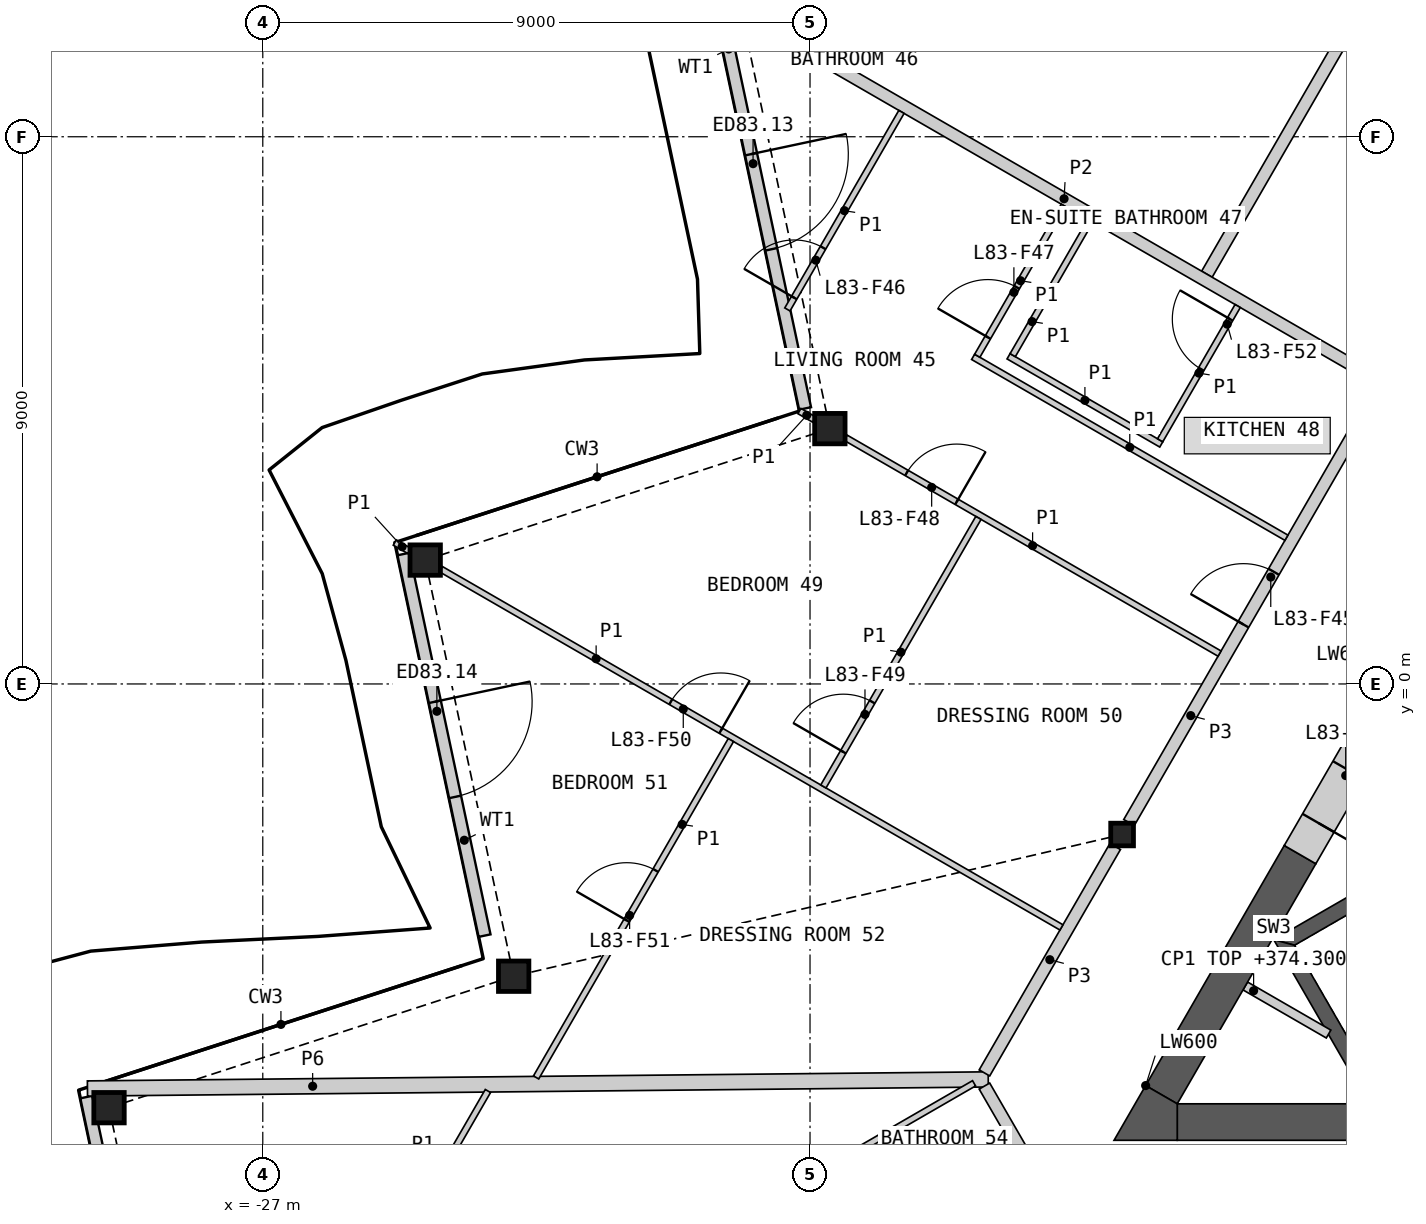
"""IFC4 building model, lengths in metres.
Left out: names, types, materials, properties, quantities, classifications, styles, units other than length and angle.
Written with IfcOpenShell. Run it as: python <this file> out.ifc"""

import sys

from ifc_helpers import new_model, si_unit, direction, frame, frame_2d, origin, origin_2d, place, context, subcontext, project, spatial, polyline, rectangle, hollow_rectangle, i_section, outline, extrude, element, fill, save


model = new_model("IFC4")
c1 = context("Model", 3, precision=1e-05, world=origin(), true_north=direction((0.0, 1.0)))
c2 = subcontext(c1, "Body", "Model", "MODEL_VIEW")
j1 = project(units=[si_unit("LENGTHUNIT", "METRE"), si_unit("PLANEANGLEUNIT", "RADIAN")], contexts=[c1])
p1 = place(None, origin())
s1 = spatial("IfcSite", under=j1, at=p1, CompositionType="ELEMENT")
p2 = place(p1, origin())
s2 = spatial("IfcBuilding", under=s1, at=p2, CompositionType="ELEMENT")
p3 = place(p2, frame((0.0, 0.0, 371.2)))
s3 = spatial("IfcBuildingStorey", under=s2, at=p3, CompositionType="ELEMENT", Elevation=371.2)
for number, where, z_axis, x_axis in (
    (1, (-17.674, 4.199, 0.0), (0.0, 0.0, 1.0), (1.0, 0.0, 0.0)),
    (2, (-24.329, 2.037, 0.0), (0.0, 0.0, 1.0), (1.0, 0.0, 0.0)),
    (3, (-22.874, -4.807, 0.0), (0.0, 0.0, 1.0), (1.0, 0.0, 0.0)),
    (4, (-29.529, -6.969, 0.0), (0.0, 0.0, 1.0), (1.0, 0.0, 0.0)),
):
    element("IfcColumn", number, at=place(p3, frame(where, z_axis=z_axis, x_axis=x_axis)), inside=s3, PredefinedType="COLUMN", context=c2, shape_type="SweptSolid", body=[
        extrude(hollow_rectangle(XDim=0.5, YDim=0.5, WallThickness=0.03, at=origin_2d()), origin(), (0.0, 0.0, 1.0), 3.4),
    ])
p4 = place(p3, frame((-12.868, -2.476, 0.0), z_axis=(0.0, 0.0, 1.0), x_axis=(1.0, 0.0, 0.0)))
e5 = element("IfcColumn", 5, at=p4, inside=s3, PredefinedType="COLUMN", context=c2, shape_type="SweptSolid", body=[
    extrude(i_section(OverallWidth=0.374, OverallDepth=0.372, WebThickness=0.016, FlangeThickness=0.026, at=origin_2d()), origin(), (0.0, 0.0, 1.0), 3.4),
])
p5 = place(p3, frame((-19.477, 11.1, 0.0), z_axis=(0.0, 0.0, 1.0), x_axis=(0.207910061304, -0.978147947096, 0.0)))
e6 = element("IfcWall", 6, at=p5, inside=s3, PredefinedType="SOLIDWALL", context=c2, shape_type="SweptSolid", body=[
    extrude(rectangle(XDim=6.716, YDim=0.2, at=frame_2d((3.358, 0.0))), origin(), (0.0, 0.0, 1.0), 2.634),
])
p6 = place(p5, frame((2.439, 0.0, 0.0)))
e7 = element("IfcOpeningElement", 7, at=p6, cuts=e6, PredefinedType="OPENING", context=c2, shape_type="SweptSolid", body=[
    extrude(rectangle(XDim=1.6, YDim=2.25, at=frame_2d((0.8, 1.125))), frame((0.0, 0.11, 0.0), z_axis=(0.0, -1.0, 0.0), x_axis=(1.0, 0.0, 0.0)), (0.0, 0.0, 1.0), 0.22),
])
p7 = place(p3, frame((-24.687, 2.137, 0.0), z_axis=(0.0, 0.0, 1.0), x_axis=(0.207904718109, -0.978149082803, 0.0)))
e8 = element("IfcWall", 8, at=p7, inside=s3, PredefinedType="SOLIDWALL", context=c2, shape_type="SweptSolid", body=[
    extrude(rectangle(XDim=6.416, YDim=0.2, at=frame_2d((3.208, 0.0))), origin(), (0.0, 0.0, 1.0), 2.634),
])
p8 = place(p7, frame((2.484, 0.0, 0.0)))
e9 = element("IfcOpeningElement", 9, at=p8, cuts=e8, PredefinedType="OPENING", context=c2, shape_type="SweptSolid", body=[
    extrude(rectangle(XDim=1.6, YDim=2.25, at=frame_2d((0.8, 1.125))), frame((0.0, 0.11, 0.0), z_axis=(0.0, -1.0, 0.0), x_axis=(1.0, 0.0, 0.0)), (0.0, 0.0, 1.0), 0.22),
])
p9 = place(p3, frame((-29.903, -6.795, 0.0), z_axis=(0.0, 0.0, 1.0), x_axis=(0.207923959653, -0.978144992832, 0.0)))
e10 = element("IfcWall", 10, at=p9, inside=s3, PredefinedType="SOLIDWALL", context=c2, shape_type="SweptSolid", body=[
    extrude(rectangle(XDim=6.493, YDim=0.2, at=frame_2d((3.247, 0.0))), origin(), (0.0, 0.0, 1.0), 2.634),
])
p10 = place(p9, frame((2.561, 0.0, 0.0)))
e11 = element("IfcOpeningElement", 11, at=p10, cuts=e10, PredefinedType="OPENING", context=c2, shape_type="SweptSolid", body=[
    extrude(rectangle(XDim=1.6, YDim=2.25, at=frame_2d((0.8, 1.125))), frame((0.0, 0.11, 0.0), z_axis=(0.0, -1.0, 0.0), x_axis=(1.0, 0.0, 0.0)), (0.0, 0.0, 1.0), 0.22),
])
p11 = place(p3, origin())
e12 = element("IfcWall", 12, at=p11, inside=s3, PredefinedType="SHEAR", context=c2, shape_type="SweptSolid", body=[
    extrude(outline(polyline([(-5.307, -1.281), (-10.374, -4.206), (-10.032, -4.298), (-5.182, -1.498), (-5.307, -1.281)])), origin(), (0.0, 0.0, 1.0), 3.1),
])
p12 = place(p3, origin())
e13 = element("IfcWall", 13, at=p12, inside=s3, PredefinedType="SHEAR", context=c2, shape_type="SweptSolid", body=[
    extrude(outline(polyline([(-10.374, -4.206), (-8.83, -6.881), (-8.738, -6.539), (-10.032, -4.298), (-10.374, -4.206)])), origin(), (0.0, 0.0, 1.0), 3.1),
])
p13 = place(p3, frame((-10.842, -4.967, 0.0), z_axis=(0.0, 0.0, 1.0), x_axis=(0.866098216386, -0.499873863663, 0.0)))
e14 = element("IfcWall", 14, at=p13, inside=s3, PredefinedType="PARTITIONING", context=c2, shape_type="SweptSolid", body=[
    extrude(rectangle(XDim=1.582, YDim=0.15, at=frame_2d((0.791, 0.0))), origin(), (0.0, 0.0, 1.0), 3.1),
])
p14 = place(p3, frame((-11.961, -7.206, 0.0), z_axis=(0.0, 0.0, 1.0), x_axis=(1.0, 0.0, 0.0)))
e15 = element("IfcWall", 15, at=p14, inside=s3, PredefinedType="SHEAR", context=c2, shape_type="SweptSolid", body=[
    extrude(rectangle(XDim=4.868, YDim=0.6, at=frame_2d((2.434, 0.0))), origin(), (0.0, 0.0, 1.0), 3.1),
])
p15 = place(p3, frame((-9.941, -2.807, 0.0), z_axis=(0.0, 0.0, 1.0), x_axis=(-0.500020646047, -0.866013483456, 0.0)))
e16 = element("IfcWall", 16, at=p15, inside=s3, PredefinedType="SHEAR", context=c2, shape_type="SweptSolid", body=[
    extrude(rectangle(XDim=4.559, YDim=0.6, at=frame_2d((2.28, 0.0))), origin(), (0.0, 0.0, 1.0), 3.1),
])
p16 = place(p3, origin())
e17 = element("IfcWall", 17, at=p16, inside=s3, PredefinedType="SHEAR", context=c2, shape_type="SweptSolid", body=[
    extrude(outline(polyline([(-12.48, -6.606), (-11.961, -6.906), (-11.961, -7.506), (-13.0, -7.506), (-12.48, -6.606)])), origin(), (0.0, 0.0, 1.0), 3.1),
])
p17 = place(p3, frame((-8.44, -0.208, 0.0), z_axis=(0.0, 0.0, 1.0), x_axis=(-0.499997052475, -0.866027105532, 0.0)))
e18 = element("IfcWall", 18, at=p17, inside=s3, PredefinedType="SHEAR", context=c2, shape_type="SweptSolid", body=[
    extrude(rectangle(XDim=3.001, YDim=0.6, at=frame_2d((1.501, 0.0))), origin(), (0.0, 0.0, 1.0), 3.1),
])
p18 = place(p17, frame((1.4, 0.0, 0.0)))
e19 = element("IfcOpeningElement", 19, at=p18, cuts=e18, PredefinedType="OPENING", context=c2, shape_type="SweptSolid", body=[
    extrude(rectangle(XDim=1.0, YDim=2.1, at=frame_2d((0.5, 1.05))), frame((0.0, 0.31, 0.0), z_axis=(0.0, -1.0, 0.0), x_axis=(1.0, 0.0, 0.0)), (0.0, 0.0, 1.0), 0.62),
])
p19 = place(p3, frame((-29.883, -6.654, 0.0), z_axis=(0.0, 0.0, 1.0), x_axis=(0.999949143254, 0.010085182526, 0.0)))
e20 = element("IfcWall", 20, at=p19, inside=s3, PredefinedType="PARTITIONING", context=c2, shape_type="SweptSolid", body=[
    extrude(rectangle(XDim=14.815, YDim=0.25, at=frame_2d((7.408, 0.0))), origin(), (0.0, 0.0, 1.0), 2.33),
])
p20 = place(p3, frame((-12.754, -2.279, 0.0), z_axis=(0.0, 0.0, 1.0), x_axis=(0.500001682468, 0.866024432409, 0.0)))
e21 = element("IfcWall", 21, at=p20, inside=s3, PredefinedType="PARTITIONING", context=c2, shape_type="SweptSolid", body=[
    extrude(rectangle(XDim=8.124, YDim=0.2, at=frame_2d((4.062, 0.0))), origin(), (0.0, 0.0, 1.0), 3.1),
])
p21 = place(p20, frame((3.762, 0.0, 0.0)))
e22 = element("IfcOpeningElement", 22, at=p21, cuts=e21, PredefinedType="OPENING", context=c2, shape_type="SweptSolid", body=[
    extrude(rectangle(XDim=1.0, YDim=2.1, at=frame_2d((0.5, 1.05))), frame((0.0, 0.11, 0.0), z_axis=(0.0, -1.0, 0.0), x_axis=(1.0, 0.0, 0.0)), (0.0, 0.0, 1.0), 0.22),
])
p22 = place(p3, frame((-15.131, -6.397, 0.0), z_axis=(0.0, 0.0, 1.0), x_axis=(0.499986217557, 0.866033360935, 0.0)))
e23 = element("IfcWall", 23, at=p22, inside=s3, PredefinedType="PARTITIONING", context=c2, shape_type="SweptSolid", body=[
    extrude(rectangle(XDim=4.3, YDim=0.2, at=frame_2d((2.15, 0.0))), origin(), (0.0, 0.0, 1.0), 3.1),
])
p23 = place(p3, frame((-15.131, -6.614, 0.0), z_axis=(0.0, 0.0, 1.0), x_axis=(0.499967746641, -0.866044024469, 0.0)))
e24 = element("IfcWall", 24, at=p23, inside=s3, PredefinedType="PARTITIONING", context=c2, shape_type="SweptSolid", body=[
    extrude(rectangle(XDim=3.676, YDim=0.2, at=frame_2d((1.838, 0.0))), origin(), (0.0, 0.0, 1.0), 3.1),
])
p24 = place(p23, frame((2.426, 0.0, 0.0)))
e25 = element("IfcOpeningElement", 25, at=p24, cuts=e24, PredefinedType="OPENING", context=c2, shape_type="SweptSolid", body=[
    extrude(rectangle(XDim=1.0, YDim=2.1, at=frame_2d((0.5, 1.05))), frame((0.0, 0.11, 0.0), z_axis=(0.0, -1.0, 0.0), x_axis=(1.0, 0.0, 0.0)), (0.0, 0.0, 1.0), 0.22),
])
p25 = place(p3, frame((-11.473, 6.74, 0.0), z_axis=(0.0, 0.0, 1.0), x_axis=(0.500001082559, 0.866024778768, 0.0)))
e26 = element("IfcWall", 26, at=p25, inside=s3, PredefinedType="PARTITIONING", context=c2, shape_type="SweptSolid", body=[
    extrude(rectangle(XDim=15.094, YDim=0.2, at=frame_2d((7.547, 0.0))), origin(), (0.0, 0.0, 1.0), 2.33),
])
p26 = place(p25, frame((10.383, 0.0, 0.0)))
e27 = element("IfcOpeningElement", 27, at=p26, cuts=e26, PredefinedType="OPENING", context=c2, shape_type="SweptSolid", body=[
    extrude(rectangle(XDim=0.95, YDim=2.1, at=frame_2d((0.475, 1.05))), frame((0.0, 0.11, 0.0), z_axis=(0.0, -1.0, 0.0), x_axis=(1.0, 0.0, 0.0)), (0.0, 0.0, 1.0), 0.22),
])
p27 = place(p3, frame((-18.869, 10.894, 0.0), z_axis=(0.0, 0.0, 1.0), x_axis=(0.866023724155, -0.500002909193, 0.0)))
e28 = element("IfcWall", 28, at=p27, inside=s3, PredefinedType="PARTITIONING", context=c2, shape_type="SweptSolid", body=[
    extrude(rectangle(XDim=11.655, YDim=0.2, at=frame_2d((5.827, 0.0))), origin(), (0.0, 0.0, 1.0), 2.33),
])
p28 = place(p3, frame((-24.069, 1.887, 0.0), z_axis=(0.0, 0.0, 1.0), x_axis=(0.866023404247, -0.500003463284, 0.0)))
e29 = element("IfcWall", 29, at=p28, inside=s3, PredefinedType="PARTITIONING", context=c2, shape_type="SweptSolid", body=[
    extrude(rectangle(XDim=11.782, YDim=0.1, at=frame_2d((5.891, 0.0))), origin(), (0.0, 0.0, 1.0), 2.33),
])
p29 = place(p28, frame((4.363, 0.0, 0.0)))
e30 = element("IfcOpeningElement", 30, at=p29, cuts=e29, PredefinedType="OPENING", context=c2, shape_type="SweptSolid", body=[
    extrude(rectangle(XDim=0.95, YDim=2.1, at=frame_2d((0.475, 1.05))), frame((0.0, 0.06, 0.0), z_axis=(0.0, -1.0, 0.0), x_axis=(1.0, 0.0, 0.0)), (0.0, 0.0, 1.0), 0.12),
])
p30 = place(p3, frame((-17.414, 4.049, 0.0), z_axis=(0.0, 0.0, 1.0), x_axis=(0.866033839264, -0.499985389037, 0.0)))
e31 = element("IfcWall", 31, at=p30, inside=s3, PredefinedType="PARTITIONING", context=c2, shape_type="SweptSolid", body=[
    extrude(rectangle(XDim=7.1, YDim=0.1, at=frame_2d((3.55, 0.0))), origin(), (0.0, 0.0, 1.0), 2.33),
])
p31 = place(p30, frame((1.158, 0.0, 0.0)))
e32 = element("IfcOpeningElement", 32, at=p31, cuts=e31, PredefinedType="OPENING", context=c2, shape_type="SweptSolid", body=[
    extrude(rectangle(XDim=0.95, YDim=2.1, at=frame_2d((0.475, 1.05))), frame((0.0, 0.06, 0.0), z_axis=(0.0, -1.0, 0.0), x_axis=(1.0, 0.0, 0.0)), (0.0, 0.0, 1.0), 0.12),
])
p32 = place(p3, frame((-22.505, -6.472, 0.0), z_axis=(0.0, 0.0, 1.0), x_axis=(0.499999516514, 0.866025682925, 0.0)))
e33 = element("IfcWall", 33, at=p32, inside=s3, PredefinedType="PARTITIONING", context=c2, shape_type="SweptSolid", body=[
    extrude(rectangle(XDim=6.407, YDim=0.1, at=frame_2d((3.204, 0.0))), origin(), (0.0, 0.0, 1.0), 2.33),
])
p33 = place(p32, frame((2.981, 0.0, 0.0)))
e34 = element("IfcOpeningElement", 34, at=p33, cuts=e33, PredefinedType="OPENING", context=c2, shape_type="SweptSolid", body=[
    extrude(rectangle(XDim=0.95, YDim=2.1, at=frame_2d((0.475, 1.05))), frame((0.0, 0.06, 0.0), z_axis=(0.0, -1.0, 0.0), x_axis=(1.0, 0.0, 0.0)), (0.0, 0.0, 1.0), 0.12),
])
p34 = place(p3, frame((-15.318, 5.38, 0.0), z_axis=(0.0, 0.0, 1.0), x_axis=(0.866035260786, -0.499982926783, 0.0)))
e35 = element("IfcWall", 35, at=p34, inside=s3, PredefinedType="PARTITIONING", context=c2, shape_type="SweptSolid", body=[
    extrude(rectangle(XDim=5.95, YDim=0.1, at=frame_2d((2.975, 0.0))), origin(), (0.0, 0.0, 1.0), 2.33),
])
p35 = place(p3, frame((-17.78, -1.686, 0.0), z_axis=(0.0, 0.0, 1.0), x_axis=(0.500005610874, 0.86602216432, 0.0)))
e36 = element("IfcWall", 36, at=p35, inside=s3, PredefinedType="PARTITIONING", context=c2, shape_type="SweptSolid", body=[
    extrude(rectangle(XDim=5.1, YDim=0.1, at=frame_2d((2.55, 0.0))), origin(), (0.0, 0.0, 1.0), 2.33),
])
p36 = place(p35, frame((0.656, 0.0, 0.0)))
e37 = element("IfcOpeningElement", 37, at=p36, cuts=e36, PredefinedType="OPENING", context=c2, shape_type="SweptSolid", body=[
    extrude(rectangle(XDim=0.95, YDim=2.1, at=frame_2d((0.475, 1.05))), frame((0.0, 0.06, 0.0), z_axis=(0.0, -1.0, 0.0), x_axis=(1.0, 0.0, 0.0)), (0.0, 0.0, 1.0), 0.12),
])
p37 = place(p3, frame((-18.372, 6.16, 0.0), z_axis=(0.0, 0.0, 1.0), x_axis=(0.499981580887, 0.866036037803, 0.0)))
e38 = element("IfcWall", 38, at=p37, inside=s3, PredefinedType="PARTITIONING", context=c2, shape_type="SweptSolid", body=[
    extrude(rectangle(XDim=3.752, YDim=0.1, at=frame_2d((1.876, 0.0))), origin(), (0.0, 0.0, 1.0), 2.33),
])
p38 = place(p37, frame((0.222, 0.0, 0.0)))
e39 = element("IfcOpeningElement", 39, at=p38, cuts=e38, PredefinedType="OPENING", context=c2, shape_type="SweptSolid", body=[
    extrude(rectangle(XDim=0.95, YDim=2.1, at=frame_2d((0.475, 1.05))), frame((0.0, 0.06, 0.0), z_axis=(0.0, -1.0, 0.0), x_axis=(1.0, 0.0, 0.0)), (0.0, 0.0, 1.0), 0.12),
])
p39 = place(p3, frame((-24.726, -9.169, 0.0), z_axis=(0.0, 0.0, 1.0), x_axis=(0.499971481985, 0.866041868042, 0.0)))
e40 = element("IfcWall", 40, at=p39, inside=s3, PredefinedType="PARTITIONING", context=c2, shape_type="SweptSolid", body=[
    extrude(rectangle(XDim=2.857, YDim=0.1, at=frame_2d((1.429, 0.0))), origin(), (0.0, 0.0, 1.0), 2.33),
])
p40 = place(p3, frame((-15.25, 5.398, 0.0), z_axis=(0.0, 0.0, 1.0), x_axis=(0.499935029643, 0.866062911188, 0.0)))
e41 = element("IfcWall", 41, at=p40, inside=s3, PredefinedType="PARTITIONING", context=c2, shape_type="SweptSolid", body=[
    extrude(rectangle(XDim=2.85, YDim=0.1, at=frame_2d((1.425, 0.0))), origin(), (0.0, 0.0, 1.0), 2.33),
])
p41 = place(p40, frame((0.35, 0.0, 0.0)))
e42 = element("IfcOpeningElement", 42, at=p41, cuts=e41, PredefinedType="OPENING", context=c2, shape_type="SweptSolid", body=[
    extrude(rectangle(XDim=0.95, YDim=2.1, at=frame_2d((0.475, 1.05))), frame((0.0, 0.06, 0.0), z_axis=(0.0, -1.0, 0.0), x_axis=(1.0, 0.0, 0.0)), (0.0, 0.0, 1.0), 0.12),
])
p42 = place(p3, frame((-14.735, 5.389, 0.0), z_axis=(0.0, 0.0, 1.0), x_axis=(0.866032775405, -0.499987231761, 0.0)))
e43 = element("IfcWall", 43, at=p42, inside=s3, PredefinedType="PARTITIONING", context=c2, shape_type="SweptSolid", body=[
    extrude(rectangle(XDim=2.9, YDim=0.1, at=frame_2d((1.45, 0.0))), origin(), (0.0, 0.0, 1.0), 2.33),
])
p43 = place(p3, frame((-17.575, -7.881, 0.0), z_axis=(0.0, 0.0, 1.0), x_axis=(0.866036909293, 0.499980071345, 0.0)))
e44 = element("IfcWall", 44, at=p43, inside=s3, PredefinedType="PARTITIONING", context=c2, shape_type="SweptSolid", body=[
    extrude(rectangle(XDim=2.625, YDim=0.1, at=frame_2d((1.312, 0.0))), origin(), (0.0, 0.0, 1.0), 2.33),
])
p44 = place(p3, frame((-12.242, 4.008, 0.0), z_axis=(0.0, 0.0, 1.0), x_axis=(0.499948979701, 0.866054858364, 0.0)))
e45 = element("IfcWall", 45, at=p44, inside=s3, PredefinedType="PARTITIONING", context=c2, shape_type="SweptSolid", body=[
    extrude(rectangle(XDim=2.55, YDim=0.1, at=frame_2d((1.275, 0.0))), origin(), (0.0, 0.0, 1.0), 2.33),
])
p45 = place(p44, frame((1.35, 0.0, 0.0)))
e46 = element("IfcOpeningElement", 46, at=p45, cuts=e45, PredefinedType="OPENING", context=c2, shape_type="SweptSolid", body=[
    extrude(rectangle(XDim=0.95, YDim=2.1, at=frame_2d((0.475, 1.05))), frame((0.0, 0.06, 0.0), z_axis=(0.0, -1.0, 0.0), x_axis=(1.0, 0.0, 0.0)), (0.0, 0.0, 1.0), 0.12),
])
p46 = place(p3, frame((-14.667, 5.408, 0.0), z_axis=(0.0, 0.0, 1.0), x_axis=(0.499948979701, 0.866054858364, 0.0)))
e47 = element("IfcWall", 47, at=p46, inside=s3, PredefinedType="PARTITIONING", context=c2, shape_type="SweptSolid", body=[
    extrude(rectangle(XDim=2.55, YDim=0.1, at=frame_2d((1.275, 0.0))), origin(), (0.0, 0.0, 1.0), 2.33),
])
for number, where, z_axis, x_axis in (
    (48, (-18.174, 4.488, 0.0), (0.0, 0.0, 1.0), (0.866, -0.5, 0.0)),
    (49, (-24.829, 2.326, 0.0), (0.0, 0.0, 1.0), (0.866, -0.5, 0.0)),
):
    element("IfcWall", number, at=place(p3, frame(where, z_axis=z_axis, x_axis=x_axis)), inside=s3, PredefinedType="PARTITIONING", context=c2, shape_type="SweptSolid", body=[
        extrude(rectangle(XDim=0.278, YDim=0.1, at=frame_2d((0.139, 0.0))), origin(), (0.0, 0.0, 1.0), 2.33),
    ])
p47 = place(p6, origin())
e50 = element("IfcDoor", 50, at=p47, inside=s3, OperationType="DOUBLE_DOOR_SINGLE_SWING", PredefinedType="DOOR", context=c2, shape_type="SweptSolid", body=[
    extrude(rectangle(XDim=1.6, YDim=2.25, at=frame_2d((0.8, 1.125))), frame((0.0, 0.025, 0.0), z_axis=(0.0, -1.0, 0.0), x_axis=(1.0, 0.0, 0.0)), (0.0, 0.0, 1.0), 0.05),
])
fill(e7, e50)
p48 = place(p8, origin())
e51 = element("IfcDoor", 51, at=p48, inside=s3, OperationType="DOUBLE_DOOR_SINGLE_SWING", PredefinedType="DOOR", context=c2, shape_type="SweptSolid", body=[
    extrude(rectangle(XDim=1.6, YDim=2.25, at=frame_2d((0.8, 1.125))), frame((0.0, 0.025, 0.0), z_axis=(0.0, -1.0, 0.0), x_axis=(1.0, 0.0, 0.0)), (0.0, 0.0, 1.0), 0.05),
])
fill(e9, e51)
p49 = place(p18, origin())
e52 = element("IfcDoor", 52, at=p49, inside=s3, OperationType="SINGLE_SWING_RIGHT", PredefinedType="DOOR", context=c2, shape_type="SweptSolid", body=[
    extrude(rectangle(XDim=1.0, YDim=2.1, at=frame_2d((0.5, 1.05))), frame((0.0, 0.055, 0.0), z_axis=(0.0, -1.0, 0.0), x_axis=(1.0, 0.0, 0.0)), (0.0, 0.0, 1.0), 0.05),
])
fill(e19, e52)
p50 = place(p21, origin())
e53 = element("IfcDoor", 53, at=p50, inside=s3, OperationType="SINGLE_SWING_LEFT", PredefinedType="DOOR", context=c2, shape_type="SweptSolid", body=[
    extrude(rectangle(XDim=1.0, YDim=2.1, at=frame_2d((0.5, 1.05))), frame((0.0, 0.025, 0.0), z_axis=(0.0, -1.0, 0.0), x_axis=(1.0, 0.0, 0.0)), (0.0, 0.0, 1.0), 0.05),
])
fill(e22, e53)
p51 = place(p38, origin())
e54 = element("IfcDoor", 54, at=p51, inside=s3, OperationType="SINGLE_SWING_LEFT", PredefinedType="DOOR", context=c2, shape_type="SweptSolid", body=[
    extrude(rectangle(XDim=0.95, YDim=2.1, at=frame_2d((0.475, 1.05))), frame((0.0, 0.025, 0.0), z_axis=(0.0, -1.0, 0.0), x_axis=(1.0, 0.0, 0.0)), (0.0, 0.0, 1.0), 0.05),
])
fill(e39, e54)
p52 = place(p41, origin())
e55 = element("IfcDoor", 55, at=p52, inside=s3, OperationType="SINGLE_SWING_LEFT", PredefinedType="DOOR", context=c2, shape_type="SweptSolid", body=[
    extrude(rectangle(XDim=0.95, YDim=2.1, at=frame_2d((0.475, 1.05))), frame((0.0, 0.025, 0.0), z_axis=(0.0, -1.0, 0.0), x_axis=(1.0, 0.0, 0.0)), (0.0, 0.0, 1.0), 0.05),
])
fill(e42, e55)
p53 = place(p31, origin())
e56 = element("IfcDoor", 56, at=p53, inside=s3, OperationType="SINGLE_SWING_RIGHT", PredefinedType="DOOR", context=c2, shape_type="SweptSolid", body=[
    extrude(rectangle(XDim=0.95, YDim=2.1, at=frame_2d((0.475, 1.05))), frame((0.0, 0.025, 0.0), z_axis=(0.0, -1.0, 0.0), x_axis=(1.0, 0.0, 0.0)), (0.0, 0.0, 1.0), 0.05),
])
fill(e32, e56)
p54 = place(p36, origin())
e57 = element("IfcDoor", 57, at=p54, inside=s3, OperationType="SINGLE_SWING_LEFT", PredefinedType="DOOR", context=c2, shape_type="SweptSolid", body=[
    extrude(rectangle(XDim=0.95, YDim=2.1, at=frame_2d((0.475, 1.05))), frame((0.0, 0.025, 0.0), z_axis=(0.0, -1.0, 0.0), x_axis=(1.0, 0.0, 0.0)), (0.0, 0.0, 1.0), 0.05),
])
fill(e37, e57)
p55 = place(p29, origin())
e58 = element("IfcDoor", 58, at=p55, inside=s3, OperationType="SINGLE_SWING_RIGHT", PredefinedType="DOOR", context=c2, shape_type="SweptSolid", body=[
    extrude(rectangle(XDim=0.95, YDim=2.1, at=frame_2d((0.475, 1.05))), frame((0.0, 0.025, 0.0), z_axis=(0.0, -1.0, 0.0), x_axis=(1.0, 0.0, 0.0)), (0.0, 0.0, 1.0), 0.05),
])
fill(e30, e58)
p56 = place(p33, origin())
e59 = element("IfcDoor", 59, at=p56, inside=s3, OperationType="SINGLE_SWING_LEFT", PredefinedType="DOOR", context=c2, shape_type="SweptSolid", body=[
    extrude(rectangle(XDim=0.95, YDim=2.1, at=frame_2d((0.475, 1.05))), frame((0.0, 0.025, 0.0), z_axis=(0.0, -1.0, 0.0), x_axis=(1.0, 0.0, 0.0)), (0.0, 0.0, 1.0), 0.05),
])
fill(e34, e59)
p57 = place(p45, origin())
e60 = element("IfcDoor", 60, at=p57, inside=s3, OperationType="SINGLE_SWING_RIGHT", PredefinedType="DOOR", context=c2, shape_type="SweptSolid", body=[
    extrude(rectangle(XDim=0.95, YDim=2.1, at=frame_2d((0.475, 1.05))), frame((0.0, 0.025, 0.0), z_axis=(0.0, -1.0, 0.0), x_axis=(1.0, 0.0, 0.0)), (0.0, 0.0, 1.0), 0.05),
])
fill(e46, e60)
save(model, sys.argv[1])
